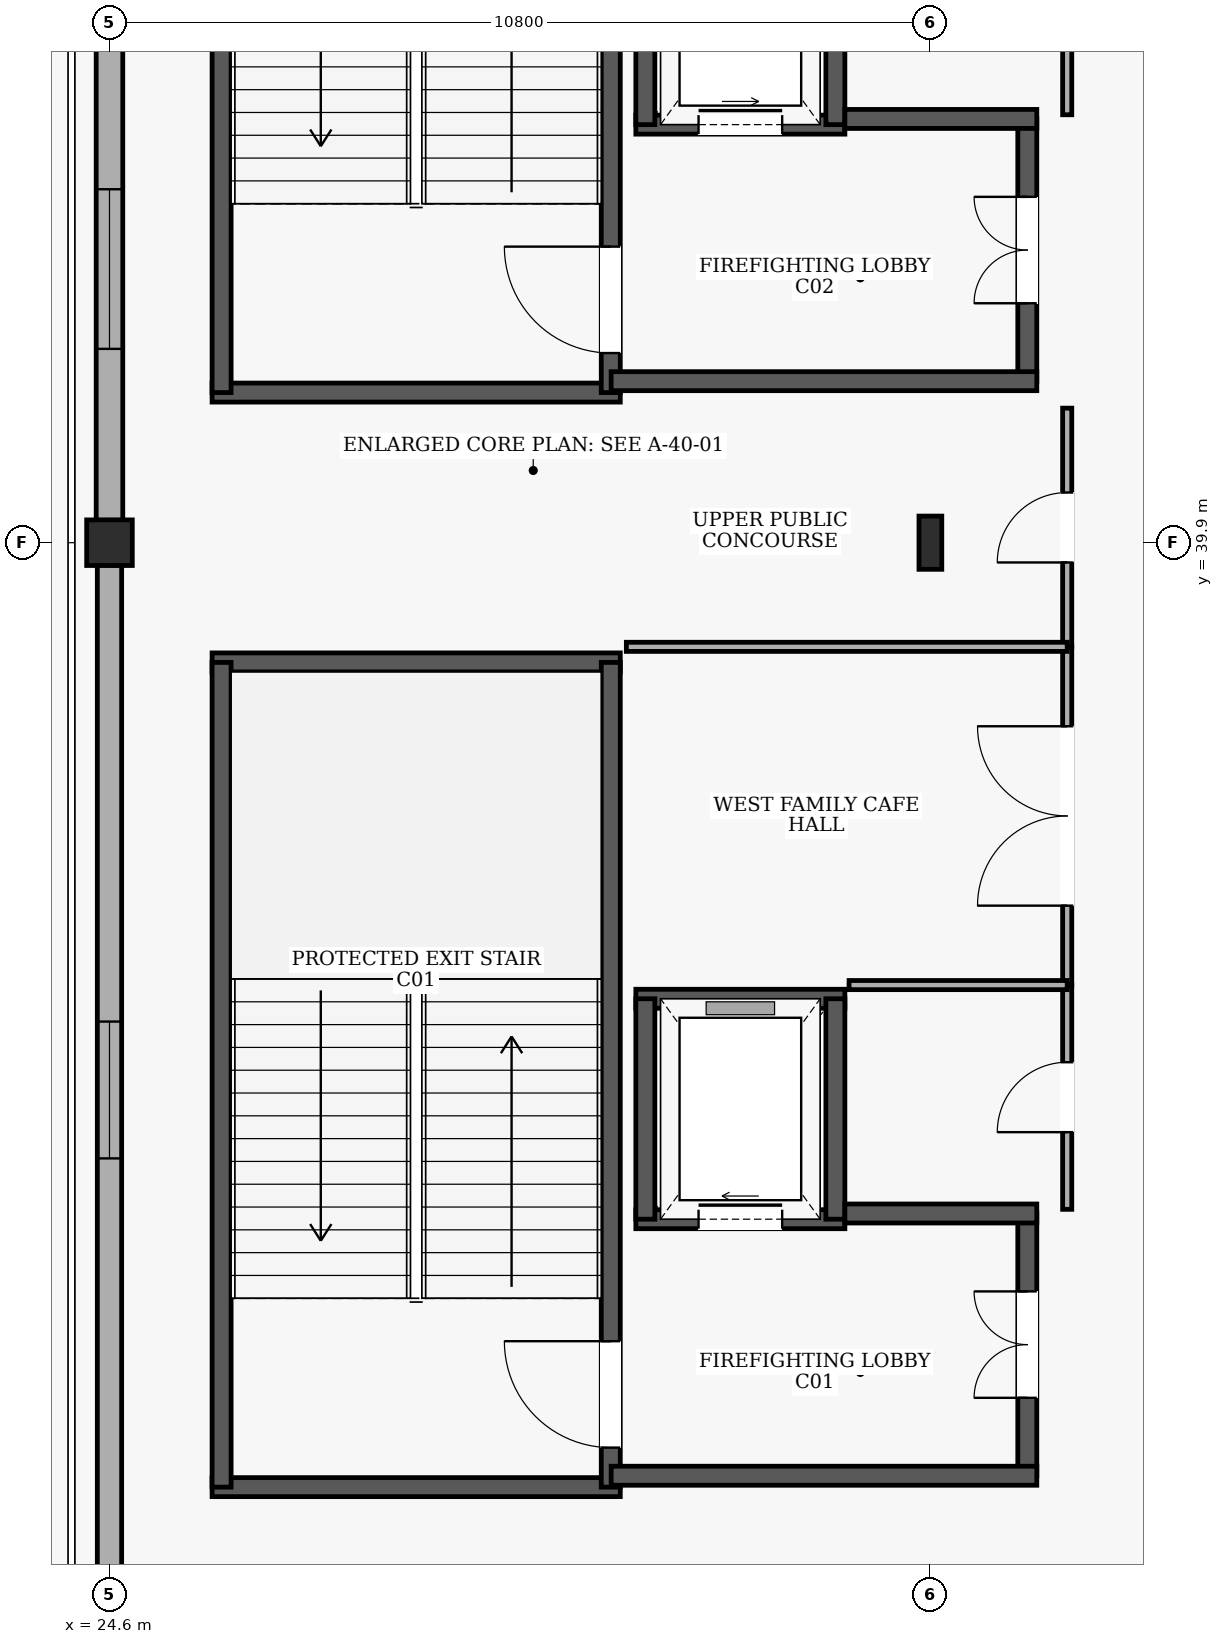
"""IFC4 building model, lengths in metres.
Left out: names, types, materials, properties, quantities, classifications, styles, units other than length and angle.
Written with IfcOpenShell. Run it as: python <this file> out.ifc"""

import sys

from ifc_helpers import new_model, si_unit, direction, frame, frame_2d, origin, origin_2d, place, context, subcontext, project, spatial, rectangle, i_section, extrude, element, fill, save


model = new_model("IFC4")
c1 = context("Model", 3, precision=1e-05, world=origin(), true_north=direction((0.0, 1.0)))
c2 = subcontext(c1, "Body", "Model", "MODEL_VIEW")
j1 = project(units=[si_unit("LENGTHUNIT", "METRE"), si_unit("PLANEANGLEUNIT", "RADIAN")], contexts=[c1])
p1 = place(None, origin())
s1 = spatial("IfcSite", under=j1, at=p1, CompositionType="ELEMENT")
p2 = place(p1, origin())
s2 = spatial("IfcBuilding", under=s1, at=p2, CompositionType="ELEMENT")
p3 = place(p2, frame((0.0, 0.0, 15.0)))
s3 = spatial("IfcBuildingStorey", under=s2, at=p3, CompositionType="ELEMENT", Elevation=15.0)
p4 = place(p3, frame((24.6, 39.9, 0.0), z_axis=(0.0, 0.0, 1.0), x_axis=(1.0, 0.0, 0.0)))
e1 = element("IfcColumn", 1, at=p4, inside=s3, PredefinedType="COLUMN", context=c2, shape_type="SweptSolid", body=[
    extrude(rectangle(XDim=0.6, YDim=0.6, at=origin_2d()), origin(), (0.0, 0.0, 1.0), 4.8),
])
p5 = place(p3, frame((35.4, 39.9, 0.0), z_axis=(0.0, 0.0, 1.0), x_axis=(1.0, 0.0, 0.0)))
e2 = element("IfcColumn", 2, at=p5, inside=s3, PredefinedType="COLUMN", context=c2, shape_type="SweptSolid", body=[
    extrude(i_section(OverallWidth=0.3, OverallDepth=0.7, WebThickness=0.017, FlangeThickness=0.032, at=origin_2d()), origin(), (0.0, 0.0, 1.0), 4.8),
])
p6 = place(p3, frame((24.6, 25.795, 0.0), z_axis=(0.0, 0.0, 1.0), x_axis=(0.0, 1.0, 0.0)))
e3 = element("IfcWall", 3, at=p6, inside=s3, PredefinedType="SOLIDWALL", context=c2, shape_type="SweptSolid", body=[
    extrude(rectangle(XDim=13.81, YDim=0.32, at=frame_2d((6.905, 0.0))), origin(), (0.0, 0.0, 1.0), 3.58),
])
p7 = place(p6, frame((6.005, 0.0, 0.9)))
e4 = element("IfcOpeningElement", 4, at=p7, cuts=e3, PredefinedType="OPENING", context=c2, shape_type="SweptSolid", body=[
    extrude(rectangle(XDim=1.8, YDim=1.8, at=frame_2d((0.9, 0.9))), frame((0.0, 0.17, 0.0), z_axis=(0.0, -1.0, 0.0), x_axis=(1.0, 0.0, 0.0)), (0.0, 0.0, 1.0), 0.34),
])
p8 = place(p3, frame((24.6, 40.195, 0.0), z_axis=(0.0, 0.0, 1.0), x_axis=(0.0, 1.0, 0.0)))
e5 = element("IfcWall", 5, at=p8, inside=s3, PredefinedType="SOLIDWALL", context=c2, shape_type="SweptSolid", body=[
    extrude(rectangle(XDim=6.61, YDim=0.35, at=frame_2d((3.305, 0.0))), origin(), (0.0, 0.0, 1.0), 3.88),
])
p9 = place(p8, frame((2.255, 0.0, 0.9)))
e6 = element("IfcOpeningElement", 6, at=p9, cuts=e5, PredefinedType="OPENING", context=c2, shape_type="SweptSolid", body=[
    extrude(rectangle(XDim=2.1, YDim=1.8, at=frame_2d((1.05, 0.9))), frame((0.0, 0.185, 0.0), z_axis=(0.0, -1.0, 0.0), x_axis=(1.0, 0.0, 0.0)), (0.0, 0.0, 1.0), 0.37),
])
for number, where, z_axis, x_axis in (
    (7, (25.95, 27.475, 0.0), (0.0, 0.0, 1.0), (1.0, 0.0, 0.0)),
    (8, (31.32, 38.325, 0.0), (0.0, 0.0, 1.0), (-1.0, 0.0, 0.0)),
):
    element("IfcWall", number, at=place(p3, frame(where, z_axis=z_axis, x_axis=x_axis)), inside=s3, PredefinedType="SHEAR", context=c2, shape_type="SweptSolid", body=[
        extrude(rectangle(XDim=5.37, YDim=0.25, at=frame_2d((2.685, 0.0))), origin(), (0.0, 0.0, 1.0), 4.5),
    ])
p10 = place(p3, frame((26.075, 27.475, 0.0), z_axis=(0.0, 0.0, 1.0), x_axis=(0.0, 1.0, 0.0)))
e9 = element("IfcWall", 9, at=p10, inside=s3, PredefinedType="SHEAR", context=c2, shape_type="SweptSolid", body=[
    extrude(rectangle(XDim=10.85, YDim=0.25, at=frame_2d((5.425, 0.0))), origin(), (0.0, 0.0, 1.0), 4.5),
])
p11 = place(p3, frame((31.195, 27.475, 0.0), z_axis=(0.0, 0.0, 1.0), x_axis=(0.0, 1.0, 0.0)))
e10 = element("IfcWall", 10, at=p11, inside=s3, PredefinedType="SHEAR", context=c2, shape_type="SweptSolid", body=[
    extrude(rectangle(XDim=10.85, YDim=0.25, at=frame_2d((5.425, 0.0))), origin(), (0.0, 0.0, 1.0), 4.5),
])
p12 = place(p11, frame((0.52, 0.0, 0.0)))
e11 = element("IfcOpeningElement", 11, at=p12, cuts=e10, PredefinedType="OPENING", context=c2, shape_type="SweptSolid", body=[
    extrude(rectangle(XDim=1.4, YDim=2.15, at=frame_2d((0.7, 1.075))), frame((0.0, 0.135, 0.0), z_axis=(0.0, -1.0, 0.0), x_axis=(1.0, 0.0, 0.0)), (0.0, 0.0, 1.0), 0.27),
])
p13 = place(p3, frame((25.95, 41.875, 0.0), z_axis=(0.0, 0.0, 1.0), x_axis=(1.0, 0.0, 0.0)))
e12 = element("IfcWall", 12, at=p13, inside=s3, PredefinedType="SHEAR", context=c2, shape_type="SweptSolid", body=[
    extrude(rectangle(XDim=5.37, YDim=0.25, at=frame_2d((2.685, 0.0))), origin(), (0.0, 0.0, 1.0), 4.5),
])
p14 = place(p3, frame((26.075, 41.875, 0.0), z_axis=(0.0, 0.0, 1.0), x_axis=(0.0, 1.0, 0.0)))
e13 = element("IfcWall", 13, at=p14, inside=s3, PredefinedType="SHEAR", context=c2, shape_type="SweptSolid", body=[
    extrude(rectangle(XDim=10.85, YDim=0.25, at=frame_2d((5.425, 0.0))), origin(), (0.0, 0.0, 1.0), 4.5),
])
p15 = place(p3, frame((31.195, 41.875, 0.0), z_axis=(0.0, 0.0, 1.0), x_axis=(0.0, 1.0, 0.0)))
e14 = element("IfcWall", 14, at=p15, inside=s3, PredefinedType="SHEAR", context=c2, shape_type="SweptSolid", body=[
    extrude(rectangle(XDim=10.85, YDim=0.25, at=frame_2d((5.425, 0.0))), origin(), (0.0, 0.0, 1.0), 4.5),
])
p16 = place(p15, frame((0.52, 0.0, 0.0)))
e15 = element("IfcOpeningElement", 15, at=p16, cuts=e14, PredefinedType="OPENING", context=c2, shape_type="SweptSolid", body=[
    extrude(rectangle(XDim=1.4, YDim=2.15, at=frame_2d((0.7, 1.075))), frame((0.0, 0.135, 0.0), z_axis=(0.0, -1.0, 0.0), x_axis=(1.0, 0.0, 0.0)), (0.0, 0.0, 1.0), 0.27),
])
p17 = place(p3, frame((31.525, 31.0, 0.0), z_axis=(0.0, 0.0, 1.0), x_axis=(1.0, 0.0, 0.0)))
e16 = element("IfcWall", 16, at=p17, inside=s3, PredefinedType="SHEAR", context=c2, shape_type="SweptSolid", body=[
    extrude(rectangle(XDim=2.75, YDim=0.25, at=frame_2d((1.375, 0.0))), origin(), (0.0, 0.0, 1.0), 4.5),
])
p18 = place(p17, frame((0.825, 0.0, 0.0)))
e17 = element("IfcOpeningElement", 17, at=p18, cuts=e16, PredefinedType="OPENING", context=c2, shape_type="SweptSolid", body=[
    extrude(rectangle(XDim=1.1, YDim=2.15, at=frame_2d((0.55, 1.075))), frame((0.0, 0.135, 0.0), z_axis=(0.0, -1.0, 0.0), x_axis=(1.0, 0.0, 0.0)), (0.0, 0.0, 1.0), 0.27),
])
p19 = place(p3, frame((34.275, 33.9, 0.0), z_axis=(0.0, 0.0, 1.0), x_axis=(-1.0, 0.0, 0.0)))
e18 = element("IfcWall", 18, at=p19, inside=s3, PredefinedType="SHEAR", context=c2, shape_type="SweptSolid", body=[
    extrude(rectangle(XDim=2.75, YDim=0.25, at=frame_2d((1.375, 0.0))), origin(), (0.0, 0.0, 1.0), 4.5),
])
for number, where, z_axis, x_axis in (
    (19, (31.65, 33.9, 0.0), (0.0, 0.0, 1.0), (0.0, -1.0, 0.0)),
    (20, (34.15, 31.0, 0.0), (0.0, 0.0, 1.0), (0.0, 1.0, 0.0)),
):
    element("IfcWall", number, at=place(p3, frame(where, z_axis=z_axis, x_axis=x_axis)), inside=s3, PredefinedType="SHEAR", context=c2, shape_type="SweptSolid", body=[
        extrude(rectangle(XDim=2.9, YDim=0.25, at=frame_2d((1.45, 0.0))), origin(), (0.0, 0.0, 1.0), 4.5),
    ])
p20 = place(p3, frame((36.675, 27.625, 0.0), z_axis=(0.0, 0.0, 1.0), x_axis=(0.0, 1.0, 0.0)))
e21 = element("IfcWall", 21, at=p20, inside=s3, PredefinedType="SHEAR", context=c2, shape_type="SweptSolid", body=[
    extrude(rectangle(XDim=3.45, YDim=0.25, at=frame_2d((1.725, 0.0))), origin(), (0.0, 0.0, 1.0), 4.5),
])
p21 = place(p20, frame((1.025, 0.0, 0.0)))
e22 = element("IfcOpeningElement", 22, at=p21, cuts=e21, PredefinedType="OPENING", context=c2, shape_type="SweptSolid", body=[
    extrude(rectangle(XDim=1.4, YDim=2.15, at=frame_2d((0.7, 1.075))), frame((0.0, 0.135, 0.0), z_axis=(0.0, -1.0, 0.0), x_axis=(1.0, 0.0, 0.0)), (0.0, 0.0, 1.0), 0.27),
])
p22 = place(p3, frame((34.275, 31.075, 0.0), z_axis=(0.0, 0.0, 1.0), x_axis=(1.0, 0.0, 0.0)))
e23 = element("IfcWall", 23, at=p22, inside=s3, PredefinedType="SHEAR", context=c2, shape_type="SweptSolid", body=[
    extrude(rectangle(XDim=2.525, YDim=0.25, at=frame_2d((1.263, 0.0))), origin(), (0.0, 0.0, 1.0), 4.5),
])
p23 = place(p3, frame((31.2, 27.625, 0.0), z_axis=(0.0, 0.0, 1.0), x_axis=(1.0, 0.0, 0.0)))
e24 = element("IfcWall", 24, at=p23, inside=s3, PredefinedType="SHEAR", context=c2, shape_type="SweptSolid", body=[
    extrude(rectangle(XDim=5.6, YDim=0.25, at=frame_2d((2.8, 0.0))), origin(), (0.0, 0.0, 1.0), 4.5),
])
p24 = place(p3, frame((31.525, 45.4, 0.0), z_axis=(0.0, 0.0, 1.0), x_axis=(1.0, 0.0, 0.0)))
e25 = element("IfcWall", 25, at=p24, inside=s3, PredefinedType="SHEAR", context=c2, shape_type="SweptSolid", body=[
    extrude(rectangle(XDim=2.75, YDim=0.25, at=frame_2d((1.375, 0.0))), origin(), (0.0, 0.0, 1.0), 4.5),
])
p25 = place(p24, frame((0.825, 0.0, 0.0)))
e26 = element("IfcOpeningElement", 26, at=p25, cuts=e25, PredefinedType="OPENING", context=c2, shape_type="SweptSolid", body=[
    extrude(rectangle(XDim=1.1, YDim=2.15, at=frame_2d((0.55, 1.075))), frame((0.0, 0.135, 0.0), z_axis=(0.0, -1.0, 0.0), x_axis=(1.0, 0.0, 0.0)), (0.0, 0.0, 1.0), 0.27),
])
for number, where, z_axis, x_axis in (
    (27, (31.65, 48.3, 0.0), (0.0, 0.0, 1.0), (0.0, -1.0, 0.0)),
    (28, (34.15, 45.4, 0.0), (0.0, 0.0, 1.0), (0.0, 1.0, 0.0)),
):
    element("IfcWall", number, at=place(p3, frame(where, z_axis=z_axis, x_axis=x_axis)), inside=s3, PredefinedType="SHEAR", context=c2, shape_type="SweptSolid", body=[
        extrude(rectangle(XDim=2.9, YDim=0.25, at=frame_2d((1.45, 0.0))), origin(), (0.0, 0.0, 1.0), 4.5),
    ])
p26 = place(p3, frame((36.675, 42.025, 0.0), z_axis=(0.0, 0.0, 1.0), x_axis=(0.0, 1.0, 0.0)))
e29 = element("IfcWall", 29, at=p26, inside=s3, PredefinedType="SHEAR", context=c2, shape_type="SweptSolid", body=[
    extrude(rectangle(XDim=3.45, YDim=0.25, at=frame_2d((1.725, 0.0))), origin(), (0.0, 0.0, 1.0), 4.5),
])
p27 = place(p26, frame((1.025, 0.0, 0.0)))
e30 = element("IfcOpeningElement", 30, at=p27, cuts=e29, PredefinedType="OPENING", context=c2, shape_type="SweptSolid", body=[
    extrude(rectangle(XDim=1.4, YDim=2.15, at=frame_2d((0.7, 1.075))), frame((0.0, 0.135, 0.0), z_axis=(0.0, -1.0, 0.0), x_axis=(1.0, 0.0, 0.0)), (0.0, 0.0, 1.0), 0.27),
])
p28 = place(p3, frame((34.275, 45.475, 0.0), z_axis=(0.0, 0.0, 1.0), x_axis=(1.0, 0.0, 0.0)))
e31 = element("IfcWall", 31, at=p28, inside=s3, PredefinedType="SHEAR", context=c2, shape_type="SweptSolid", body=[
    extrude(rectangle(XDim=2.525, YDim=0.25, at=frame_2d((1.263, 0.0))), origin(), (0.0, 0.0, 1.0), 4.5),
])
p29 = place(p3, frame((31.2, 42.025, 0.0), z_axis=(0.0, 0.0, 1.0), x_axis=(1.0, 0.0, 0.0)))
e32 = element("IfcWall", 32, at=p29, inside=s3, PredefinedType="SHEAR", context=c2, shape_type="SweptSolid", body=[
    extrude(rectangle(XDim=5.6, YDim=0.25, at=frame_2d((2.8, 0.0))), origin(), (0.0, 0.0, 1.0), 4.5),
])
p30 = place(p3, frame((37.2, 38.53, 0.0), z_axis=(0.0, 0.0, 1.0), x_axis=(0.0, 1.0, 0.0)))
e33 = element("IfcWall", 33, at=p30, inside=s3, PredefinedType="PARTITIONING", context=c2, shape_type="SweptSolid", body=[
    extrude(rectangle(XDim=3.14, YDim=0.12, at=frame_2d((1.57, 0.0))), origin(), (0.0, 0.0, 1.0), 4.5),
])
p31 = place(p30, frame((1.11, 0.0, 0.0)))
e34 = element("IfcOpeningElement", 34, at=p31, cuts=e33, PredefinedType="OPENING", context=c2, shape_type="SweptSolid", body=[
    extrude(rectangle(XDim=0.92, YDim=2.1, at=frame_2d((0.46, 1.05))), frame((0.0, 0.07, 0.0), z_axis=(0.0, -1.0, 0.0), x_axis=(1.0, 0.0, 0.0)), (0.0, 0.0, 1.0), 0.14),
])
p32 = place(p3, frame((37.2, 34.08, 0.0), z_axis=(0.0, 0.0, 1.0), x_axis=(0.0, 1.0, 0.0)))
e35 = element("IfcWall", 35, at=p32, inside=s3, PredefinedType="PARTITIONING", context=c2, shape_type="SweptSolid", body=[
    extrude(rectangle(XDim=4.45, YDim=0.12, at=frame_2d((2.225, 0.0))), origin(), (0.0, 0.0, 1.0), 4.5),
])
p33 = place(p32, frame((1.045, 0.0, 0.0)))
e36 = element("IfcOpeningElement", 36, at=p33, cuts=e35, PredefinedType="OPENING", context=c2, shape_type="SweptSolid", body=[
    extrude(rectangle(XDim=2.36, YDim=2.4, at=frame_2d((1.18, 1.2))), frame((0.0, 0.07, 0.0), z_axis=(0.0, -1.0, 0.0), x_axis=(1.0, 0.0, 0.0)), (0.0, 0.0, 1.0), 0.14),
])
p34 = place(p3, frame((37.2, 38.53, 0.0), z_axis=(0.0, 0.0, 1.0), x_axis=(-1.0, 0.0, 0.0)))
e37 = element("IfcWall", 37, at=p34, inside=s3, PredefinedType="PARTITIONING", context=c2, shape_type="SweptSolid", body=[
    extrude(rectangle(XDim=5.8, YDim=0.12, at=frame_2d((2.9, 0.0))), origin(), (0.0, 0.0, 1.0), 4.5),
])
p35 = place(p3, frame((37.2, 31.13, 0.0), z_axis=(0.0, 0.0, 1.0), x_axis=(0.0, 1.0, 0.0)))
e38 = element("IfcWall", 38, at=p35, inside=s3, PredefinedType="PARTITIONING", context=c2, shape_type="SweptSolid", body=[
    extrude(rectangle(XDim=2.95, YDim=0.12, at=frame_2d((1.475, 0.0))), origin(), (0.0, 0.0, 1.0), 4.5),
])
p36 = place(p35, frame((1.015, 0.0, 0.0)))
e39 = element("IfcOpeningElement", 39, at=p36, cuts=e38, PredefinedType="OPENING", context=c2, shape_type="SweptSolid", body=[
    extrude(rectangle(XDim=0.92, YDim=2.1, at=frame_2d((0.46, 1.05))), frame((0.0, 0.07, 0.0), z_axis=(0.0, -1.0, 0.0), x_axis=(1.0, 0.0, 0.0)), (0.0, 0.0, 1.0), 0.14),
])
p37 = place(p3, frame((37.2, 34.08, 0.0), z_axis=(0.0, 0.0, 1.0), x_axis=(-1.0, 0.0, 0.0)))
e40 = element("IfcWall", 40, at=p37, inside=s3, PredefinedType="PARTITIONING", context=c2, shape_type="SweptSolid", body=[
    extrude(rectangle(XDim=2.87, YDim=0.12, at=frame_2d((1.435, 0.0))), origin(), (0.0, 0.0, 1.0), 4.5),
])
p38 = place(p3, frame((37.2, 45.53, 0.0), z_axis=(0.0, 0.0, 1.0), x_axis=(0.0, 1.0, 0.0)))
e41 = element("IfcWall", 41, at=p38, inside=s3, PredefinedType="PARTITIONING", context=c2, shape_type="SweptSolid", body=[
    extrude(rectangle(XDim=2.95, YDim=0.12, at=frame_2d((1.475, 0.0))), origin(), (0.0, 0.0, 1.0), 4.5),
])
p39 = place(p38, frame((1.015, 0.0, 0.0)))
e42 = element("IfcOpeningElement", 42, at=p39, cuts=e41, PredefinedType="OPENING", context=c2, shape_type="SweptSolid", body=[
    extrude(rectangle(XDim=0.92, YDim=2.1, at=frame_2d((0.46, 1.05))), frame((0.0, 0.07, 0.0), z_axis=(0.0, -1.0, 0.0), x_axis=(1.0, 0.0, 0.0)), (0.0, 0.0, 1.0), 0.14),
])
p40 = place(p7, origin())
e43 = element("IfcWindow", 43, at=p40, inside=s3, PartitioningType="SINGLE_PANEL", PredefinedType="WINDOW", context=c2, shape_type="SweptSolid", body=[
    extrude(rectangle(XDim=1.8, YDim=1.8, at=frame_2d((0.9, 0.9))), frame((0.0, 0.03, 0.0), z_axis=(0.0, -1.0, 0.0), x_axis=(1.0, 0.0, 0.0)), (0.0, 0.0, 1.0), 0.06),
])
fill(e4, e43)
p41 = place(p9, origin())
e44 = element("IfcWindow", 44, at=p41, inside=s3, PartitioningType="SINGLE_PANEL", PredefinedType="WINDOW", context=c2, shape_type="SweptSolid", body=[
    extrude(rectangle(XDim=2.1, YDim=1.8, at=frame_2d((1.05, 0.9))), frame((0.0, 0.03, 0.0), z_axis=(0.0, -1.0, 0.0), x_axis=(1.0, 0.0, 0.0)), (0.0, 0.0, 1.0), 0.06),
])
fill(e6, e44)
p42 = place(p12, origin())
e45 = element("IfcDoor", 45, at=p42, inside=s3, OperationType="SINGLE_SWING_RIGHT", PredefinedType="DOOR", context=c2, shape_type="SweptSolid", body=[
    extrude(rectangle(XDim=1.4, YDim=2.15, at=frame_2d((0.7, 1.075))), frame((0.0, 0.025, 0.0), z_axis=(0.0, -1.0, 0.0), x_axis=(1.0, 0.0, 0.0)), (0.0, 0.0, 1.0), 0.05),
])
fill(e11, e45)
p43 = place(p16, origin())
e46 = element("IfcDoor", 46, at=p43, inside=s3, OperationType="SINGLE_SWING_RIGHT", PredefinedType="DOOR", context=c2, shape_type="SweptSolid", body=[
    extrude(rectangle(XDim=1.4, YDim=2.15, at=frame_2d((0.7, 1.075))), frame((0.0, 0.025, 0.0), z_axis=(0.0, -1.0, 0.0), x_axis=(1.0, 0.0, 0.0)), (0.0, 0.0, 1.0), 0.05),
])
fill(e15, e46)
p44 = place(p18, origin())
e47 = element("IfcDoor", 47, at=p44, inside=s3, OperationType="SLIDING_TO_RIGHT", PredefinedType="DOOR", context=c2, shape_type="SweptSolid", body=[
    extrude(rectangle(XDim=1.1, YDim=2.15, at=frame_2d((0.55, 1.075))), frame((0.0, 0.025, 0.0), z_axis=(0.0, -1.0, 0.0), x_axis=(1.0, 0.0, 0.0)), (0.0, 0.0, 1.0), 0.05),
])
fill(e17, e47)
p45 = place(p21, origin())
e48 = element("IfcDoor", 48, at=p45, inside=s3, OperationType="DOUBLE_DOOR_SINGLE_SWING", PredefinedType="DOOR", context=c2, shape_type="SweptSolid", body=[
    extrude(rectangle(XDim=1.4, YDim=2.15, at=frame_2d((0.7, 1.075))), frame((0.0, 0.025, 0.0), z_axis=(0.0, -1.0, 0.0), x_axis=(1.0, 0.0, 0.0)), (0.0, 0.0, 1.0), 0.05),
])
fill(e22, e48)
p46 = place(p25, origin())
e49 = element("IfcDoor", 49, at=p46, inside=s3, OperationType="SLIDING_TO_LEFT", PredefinedType="DOOR", context=c2, shape_type="SweptSolid", body=[
    extrude(rectangle(XDim=1.1, YDim=2.15, at=frame_2d((0.55, 1.075))), frame((0.0, 0.025, 0.0), z_axis=(0.0, -1.0, 0.0), x_axis=(1.0, 0.0, 0.0)), (0.0, 0.0, 1.0), 0.05),
])
fill(e26, e49)
p47 = place(p27, origin())
e50 = element("IfcDoor", 50, at=p47, inside=s3, OperationType="DOUBLE_DOOR_SINGLE_SWING", PredefinedType="DOOR", context=c2, shape_type="SweptSolid", body=[
    extrude(rectangle(XDim=1.4, YDim=2.15, at=frame_2d((0.7, 1.075))), frame((0.0, 0.025, 0.0), z_axis=(0.0, -1.0, 0.0), x_axis=(1.0, 0.0, 0.0)), (0.0, 0.0, 1.0), 0.05),
])
fill(e30, e50)
p48 = place(p31, origin())
e51 = element("IfcDoor", 51, at=p48, inside=s3, OperationType="SINGLE_SWING_LEFT", PredefinedType="DOOR", context=c2, shape_type="SweptSolid", body=[
    extrude(rectangle(XDim=0.92, YDim=2.1, at=frame_2d((0.46, 1.05))), frame((0.0, 0.025, 0.0), z_axis=(0.0, -1.0, 0.0), x_axis=(1.0, 0.0, 0.0)), (0.0, 0.0, 1.0), 0.05),
])
fill(e34, e51)
p49 = place(p33, origin())
e52 = element("IfcDoor", 52, at=p49, inside=s3, OperationType="DOUBLE_DOOR_SINGLE_SWING", PredefinedType="DOOR", context=c2, shape_type="SweptSolid", body=[
    extrude(rectangle(XDim=2.36, YDim=2.4, at=frame_2d((1.18, 1.2))), frame((0.0, 0.025, 0.0), z_axis=(0.0, -1.0, 0.0), x_axis=(1.0, 0.0, 0.0)), (0.0, 0.0, 1.0), 0.05),
])
fill(e36, e52)
p50 = place(p36, origin())
e53 = element("IfcDoor", 53, at=p50, inside=s3, OperationType="SINGLE_SWING_LEFT", PredefinedType="DOOR", context=c2, shape_type="SweptSolid", body=[
    extrude(rectangle(XDim=0.92, YDim=2.1, at=frame_2d((0.46, 1.05))), frame((0.0, 0.025, 0.0), z_axis=(0.0, -1.0, 0.0), x_axis=(1.0, 0.0, 0.0)), (0.0, 0.0, 1.0), 0.05),
])
fill(e39, e53)
save(model, sys.argv[1])
